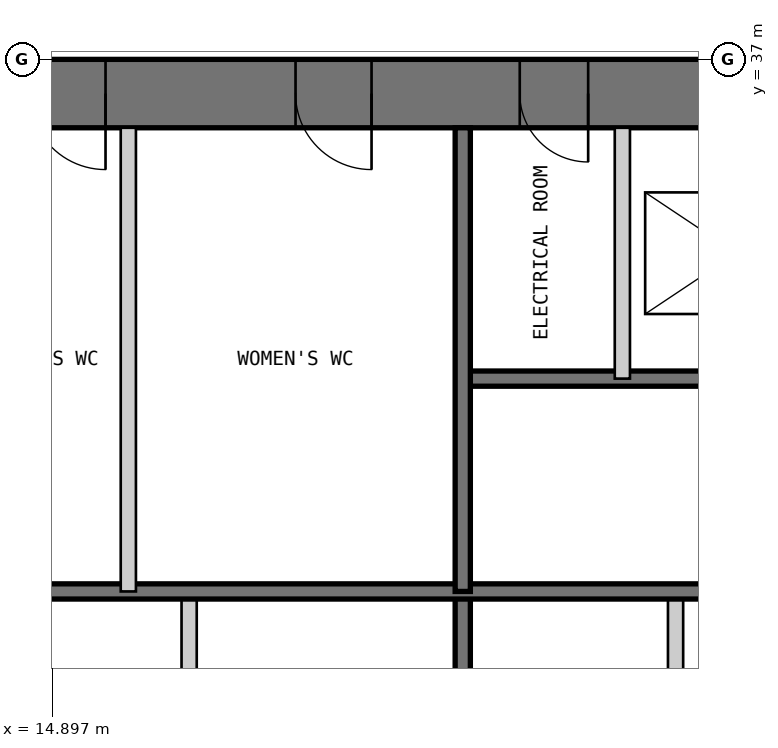
"""IFC4 building model, lengths in metres.
Left out: names, types, materials, properties, quantities, classifications, styles, units other than length and angle.
Written with IfcOpenShell. Run it as: python <this file> out.ifc"""

import sys

from ifc_helpers import new_model, si_unit, direction, frame, frame_2d, origin, place, context, subcontext, project, spatial, polyline, rectangle, outline, extrude, element, fill, save


model = new_model("IFC4")
c1 = context("Model", 3, precision=1e-05, world=origin(), true_north=direction((0.0, 1.0)))
c2 = subcontext(c1, "Body", "Model", "MODEL_VIEW")
j1 = project(units=[si_unit("LENGTHUNIT", "METRE"), si_unit("PLANEANGLEUNIT", "RADIAN")], contexts=[c1])
p1 = place(None, origin())
s1 = spatial("IfcSite", under=j1, at=p1, CompositionType="ELEMENT")
p2 = place(p1, origin())
s2 = spatial("IfcBuilding", under=s1, at=p2, CompositionType="ELEMENT")
p3 = place(p2, frame((0.0, 0.0, 283.2)))
s3 = spatial("IfcBuildingStorey", under=s2, at=p3, CompositionType="ELEMENT", Elevation=283.2)
p4 = place(p3, frame((37.0, 36.55, 0.0), z_axis=(0.0, 0.0, 1.0), x_axis=(-1.0, 0.0, 0.0)))
e1 = element("IfcWall", 1, at=p4, inside=s3, PredefinedType="SHEAR", context=c2, shape_type="SweptSolid", body=[
    extrude(outline(polyline([(0.0, -0.45), (24.0, -0.45), (23.1, 0.45), (0.9, 0.45), (0.0, -0.45)])), origin(), (0.0, 0.0, 1.0), 3.4),
])
p5 = place(p4, frame((4.9, 0.0, 0.0)))
e2 = element("IfcOpeningElement", 2, at=p5, cuts=e1, PredefinedType="OPENING", context=c2, shape_type="SweptSolid", body=[
    extrude(rectangle(XDim=1.0, YDim=2.2, at=frame_2d((0.5, 1.1))), frame((0.0, 0.46, 0.0), z_axis=(0.0, -1.0, 0.0), x_axis=(1.0, 0.0, 0.0)), (0.0, 0.0, 1.0), 0.92),
])
p6 = place(p4, frame((8.9, 0.0, 0.0)))
e3 = element("IfcOpeningElement", 3, at=p6, cuts=e1, PredefinedType="OPENING", context=c2, shape_type="SweptSolid", body=[
    extrude(rectangle(XDim=1.1, YDim=2.2, at=frame_2d((0.55, 1.1))), frame((0.0, 0.46, 0.0), z_axis=(0.0, -1.0, 0.0), x_axis=(1.0, 0.0, 0.0)), (0.0, 0.0, 1.0), 0.92),
])
p7 = place(p4, frame((15.05, 0.0, 0.0)))
e4 = element("IfcOpeningElement", 4, at=p7, cuts=e1, PredefinedType="OPENING", context=c2, shape_type="SweptSolid", body=[
    extrude(rectangle(XDim=0.9, YDim=2.2, at=frame_2d((0.45, 1.1))), frame((0.0, 0.46, 0.0), z_axis=(0.0, -1.0, 0.0), x_axis=(1.0, 0.0, 0.0)), (0.0, 0.0, 1.0), 0.92),
])
p8 = place(p4, frame((17.9, 0.0, 0.0)))
e5 = element("IfcOpeningElement", 5, at=p8, cuts=e1, PredefinedType="OPENING", context=c2, shape_type="SweptSolid", body=[
    extrude(rectangle(XDim=1.0, YDim=2.2, at=frame_2d((0.5, 1.1))), frame((0.0, 0.46, 0.0), z_axis=(0.0, -1.0, 0.0), x_axis=(1.0, 0.0, 0.0)), (0.0, 0.0, 1.0), 0.92),
])
p9 = place(p4, frame((21.4, 0.0, 0.0)))
e6 = element("IfcOpeningElement", 6, at=p9, cuts=e1, PredefinedType="OPENING", context=c2, shape_type="SweptSolid", body=[
    extrude(rectangle(XDim=1.0, YDim=2.2, at=frame_2d((0.5, 1.1))), frame((0.0, 0.46, 0.0), z_axis=(0.0, -1.0, 0.0), x_axis=(1.0, 0.0, 0.0)), (0.0, 0.0, 1.0), 0.92),
])
p10 = place(p3, frame((16.7, 13.9, 0.0), z_axis=(0.0, 0.0, 1.0), x_axis=(0.0, 1.0, 0.0)))
e7 = element("IfcWall", 7, at=p10, inside=s3, PredefinedType="PARTITIONING", context=c2, shape_type="SweptSolid", body=[
    extrude(rectangle(XDim=16.1, YDim=0.2, at=frame_2d((8.05, 0.0))), origin(), (0.0, 0.0, 1.0), 3.2),
])
p11 = place(p10, frame((8.15, 0.0, 0.0)))
e8 = element("IfcOpeningElement", 8, at=p11, cuts=e7, PredefinedType="OPENING", context=c2, shape_type="SweptSolid", body=[
    extrude(rectangle(XDim=0.9, YDim=2.2, at=frame_2d((0.45, 1.1))), frame((0.0, 0.11, 0.0), z_axis=(0.0, -1.0, 0.0), x_axis=(1.0, 0.0, 0.0)), (0.0, 0.0, 1.0), 0.22),
])
p12 = place(p10, frame((12.4, 0.0, 0.0)))
e9 = element("IfcOpeningElement", 9, at=p12, cuts=e7, PredefinedType="OPENING", context=c2, shape_type="SweptSolid", body=[
    extrude(rectangle(XDim=0.9, YDim=2.2, at=frame_2d((0.45, 1.1))), frame((0.0, 0.11, 0.0), z_axis=(0.0, -1.0, 0.0), x_axis=(1.0, 0.0, 0.0)), (0.0, 0.0, 1.0), 0.22),
])
p13 = place(p3, frame((20.3, 13.9, 0.0), z_axis=(0.0, 0.0, 1.0), x_axis=(0.0, 1.0, 0.0)))
e10 = element("IfcWall", 10, at=p13, inside=s3, PredefinedType="SOLIDWALL", context=c2, shape_type="SweptSolid", body=[
    extrude(rectangle(XDim=16.1, YDim=0.2, at=frame_2d((8.05, 0.0))), origin(), (0.0, 0.0, 1.0), 3.2),
])
p14 = place(p13, frame((7.9, 0.0, 0.0)))
e11 = element("IfcOpeningElement", 11, at=p14, cuts=e10, PredefinedType="OPENING", context=c2, shape_type="SweptSolid", body=[
    extrude(rectangle(XDim=0.9, YDim=2.2, at=frame_2d((0.45, 1.1))), frame((0.0, 0.11, 0.0), z_axis=(0.0, -1.0, 0.0), x_axis=(1.0, 0.0, 0.0)), (0.0, 0.0, 1.0), 0.22),
])
p15 = place(p13, frame((12.9, 0.0, 0.0)))
e12 = element("IfcOpeningElement", 12, at=p15, cuts=e10, PredefinedType="OPENING", context=c2, shape_type="SweptSolid", body=[
    extrude(rectangle(XDim=0.9, YDim=2.2, at=frame_2d((0.45, 1.1))), frame((0.0, 0.11, 0.0), z_axis=(0.0, -1.0, 0.0), x_axis=(1.0, 0.0, 0.0)), (0.0, 0.0, 1.0), 0.22),
])
p16 = place(p3, frame((23.1, 20.0, 0.0), z_axis=(0.0, 0.0, 1.0), x_axis=(0.0, 1.0, 0.0)))
e13 = element("IfcWall", 13, at=p16, inside=s3, PredefinedType="PARTITIONING", context=c2, shape_type="SweptSolid", body=[
    extrude(rectangle(XDim=10.0, YDim=0.2, at=frame_2d((5.0, 0.0))), origin(), (0.0, 0.0, 1.0), 3.2),
])
p17 = place(p3, frame((29.7, 32.8, 0.0), z_axis=(0.0, 0.0, 1.0), x_axis=(-1.0, 0.0, 0.0)))
e14 = element("IfcWall", 14, at=p17, inside=s3, PredefinedType="SOLIDWALL", context=c2, shape_type="SweptSolid", body=[
    extrude(rectangle(XDim=9.4, YDim=0.2, at=frame_2d((4.7, 0.0))), origin(), (0.0, 0.0, 1.0), 3.2),
])
p18 = place(p17, frame((0.25, 0.0, 0.0)))
e15 = element("IfcOpeningElement", 15, at=p18, cuts=e14, PredefinedType="OPENING", context=c2, shape_type="SweptSolid", body=[
    extrude(rectangle(XDim=1.0, YDim=2.2, at=frame_2d((0.5, 1.1))), frame((0.0, 0.11, 0.0), z_axis=(0.0, -1.0, 0.0), x_axis=(1.0, 0.0, 0.0)), (0.0, 0.0, 1.0), 0.22),
])
p19 = place(p3, frame((29.7, 30.0, 0.0), z_axis=(0.0, 0.0, 1.0), x_axis=(-1.0, 0.0, 0.0)))
e16 = element("IfcWall", 16, at=p19, inside=s3, PredefinedType="SOLIDWALL", context=c2, shape_type="SweptSolid", body=[
    extrude(rectangle(XDim=15.8, YDim=0.2, at=frame_2d((7.9, 0.0))), origin(), (0.0, 0.0, 1.0), 3.2),
])
p20 = place(p3, frame((22.4, 36.1, 0.0), z_axis=(0.0, 0.0, 1.0), x_axis=(0.0, -1.0, 0.0)))
e17 = element("IfcWall", 17, at=p20, inside=s3, PredefinedType="PARTITIONING", context=c2, shape_type="SweptSolid", body=[
    extrude(rectangle(XDim=3.3, YDim=0.2, at=frame_2d((1.65, 0.0))), origin(), (0.0, 0.0, 1.0), 3.2),
])
p21 = place(p3, frame((20.3, 36.1, 0.0), z_axis=(0.0, 0.0, 1.0), x_axis=(0.0, -1.0, 0.0)))
e18 = element("IfcWall", 18, at=p21, inside=s3, PredefinedType="SOLIDWALL", context=c2, shape_type="SweptSolid", body=[
    extrude(rectangle(XDim=6.1, YDim=0.2, at=frame_2d((3.05, 0.0))), origin(), (0.0, 0.0, 1.0), 3.2),
])
p22 = place(p3, frame((15.9, 36.1, 0.0), z_axis=(0.0, 0.0, 1.0), x_axis=(0.0, -1.0, 0.0)))
e19 = element("IfcWall", 19, at=p22, inside=s3, PredefinedType="PARTITIONING", context=c2, shape_type="SweptSolid", body=[
    extrude(rectangle(XDim=6.1, YDim=0.2, at=frame_2d((3.05, 0.0))), origin(), (0.0, 0.0, 1.0), 3.2),
])
p23 = place(p7, origin())
e20 = element("IfcDoor", 20, at=p23, inside=s3, OperationType="SINGLE_SWING_LEFT", PredefinedType="DOOR", context=c2, shape_type="SweptSolid", body=[
    extrude(rectangle(XDim=0.9, YDim=2.2, at=frame_2d((0.45, 1.1))), frame((0.0, 0.025, 0.0), z_axis=(0.0, -1.0, 0.0), x_axis=(1.0, 0.0, 0.0)), (0.0, 0.0, 1.0), 0.05),
    extrude(outline(polyline([(0.0, 0.0), (0.04, 0.0), (0.04, 2.16), (0.86, 2.16), (0.86, 0.0), (0.9, 0.0), (0.9, 2.2), (0.0, 2.2), (0.0, 0.0)])), frame((0.0, 0.3, 0.0), z_axis=(0.0, -1.0, 0.0), x_axis=(1.0, 0.0, 0.0)), (0.0, 0.0, 1.0), 0.6),
])
fill(e4, e20)
p24 = place(p8, origin())
e21 = element("IfcDoor", 21, at=p24, inside=s3, OperationType="SINGLE_SWING_LEFT", PredefinedType="DOOR", context=c2, shape_type="SweptSolid", body=[
    extrude(rectangle(XDim=1.0, YDim=2.2, at=frame_2d((0.5, 1.1))), frame((0.0, 0.025, 0.0), z_axis=(0.0, -1.0, 0.0), x_axis=(1.0, 0.0, 0.0)), (0.0, 0.0, 1.0), 0.05),
    extrude(outline(polyline([(0.0, 0.0), (0.04, 0.0), (0.04, 2.16), (0.96, 2.16), (0.96, 0.0), (1.0, 0.0), (1.0, 2.2), (0.0, 2.2), (0.0, 0.0)])), frame((0.0, 0.3, 0.0), z_axis=(0.0, -1.0, 0.0), x_axis=(1.0, 0.0, 0.0)), (0.0, 0.0, 1.0), 0.6),
])
fill(e5, e21)
p25 = place(p9, origin())
e22 = element("IfcDoor", 22, at=p25, inside=s3, OperationType="SINGLE_SWING_LEFT", PredefinedType="DOOR", context=c2, shape_type="SweptSolid", body=[
    extrude(rectangle(XDim=1.0, YDim=2.2, at=frame_2d((0.5, 1.1))), frame((0.0, 0.025, 0.0), z_axis=(0.0, -1.0, 0.0), x_axis=(1.0, 0.0, 0.0)), (0.0, 0.0, 1.0), 0.05),
    extrude(outline(polyline([(0.0, 0.0), (0.04, 0.0), (0.04, 2.16), (0.96, 2.16), (0.96, 0.0), (1.0, 0.0), (1.0, 2.2), (0.0, 2.2), (0.0, 0.0)])), frame((0.0, 0.3, 0.0), z_axis=(0.0, -1.0, 0.0), x_axis=(1.0, 0.0, 0.0)), (0.0, 0.0, 1.0), 0.6),
])
fill(e6, e22)
save(model, sys.argv[1])
